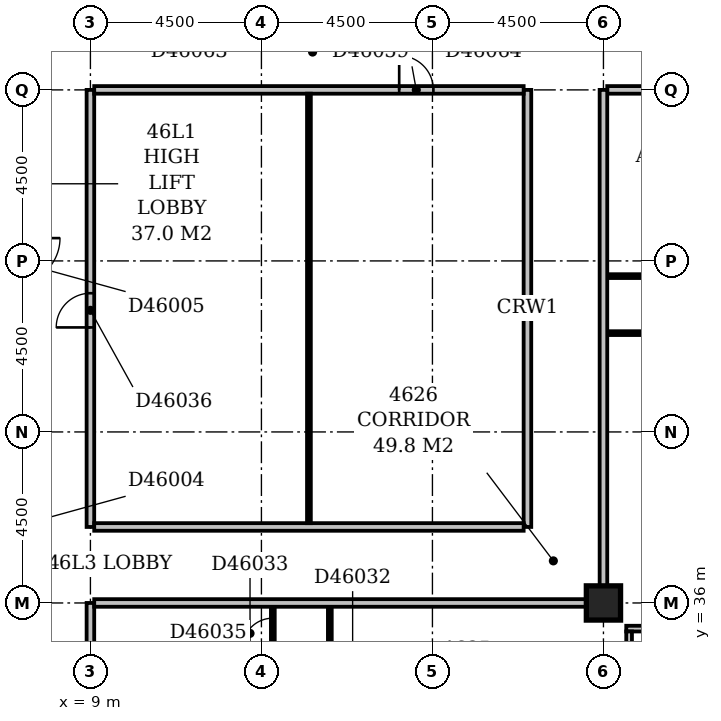
"""IFC4 building model, lengths in metres.
Left out: names, types, materials, properties, quantities, classifications, styles, units other than length and angle.
Written with IfcOpenShell. Run it as: python <this file> out.ifc"""

import sys

from ifc_helpers import new_model, si_unit, direction, frame, frame_2d, origin, origin_2d, place, context, subcontext, project, spatial, rectangle, extrude, element, fill, save


model = new_model("IFC4")
c1 = context("Model", 3, precision=1e-05, world=origin(), true_north=direction((0.0, 1.0)))
c2 = subcontext(c1, "Body", "Model", "MODEL_VIEW")
j1 = project(units=[si_unit("LENGTHUNIT", "METRE"), si_unit("PLANEANGLEUNIT", "RADIAN")], contexts=[c1])
p1 = place(None, origin())
s1 = spatial("IfcSite", under=j1, at=p1, CompositionType="ELEMENT")
p2 = place(p1, origin())
s2 = spatial("IfcBuilding", under=s1, at=p2, CompositionType="ELEMENT")
p3 = place(p2, frame((0.0, 0.0, 182.6)))
s3 = spatial("IfcBuildingStorey", under=s2, at=p3, CompositionType="ELEMENT", Elevation=182.6)
p4 = place(p3, frame((22.5, 36.0, -0.3), z_axis=(0.0, 0.0, 1.0), x_axis=(1.0, 0.0, 0.0)))
e1 = element("IfcColumn", 1, at=p4, inside=s3, PredefinedType="COLUMN", context=c2, shape_type="SweptSolid", body=[
    extrude(rectangle(XDim=0.9, YDim=0.9, at=origin_2d()), origin(), (0.0, 0.0, 1.0), 3.55),
])
p5 = place(p3, frame((23.175, 17.4, 0.0), z_axis=(0.0, 0.0, 1.0), x_axis=(0.0, 1.0, 0.0)))
e2 = element("IfcWall", 2, at=p5, inside=s3, PredefinedType="STANDARD", context=c2, shape_type="SweptSolid", body=[
    extrude(rectangle(XDim=17.85, YDim=0.15, at=frame_2d((8.925, 0.0))), origin(), (0.0, 0.0, 1.0), 2.7),
])
p6 = place(p5, frame((2.802, 0.0, 0.6)))
e3 = element("IfcOpeningElement", 3, at=p6, cuts=e2, PredefinedType="OPENING", context=c2, shape_type="SweptSolid", body=[
    extrude(rectangle(XDim=1.5, YDim=1.8, at=frame_2d((0.75, 0.9))), frame((0.0, 0.087, 0.0), z_axis=(0.0, -1.0, 0.0), x_axis=(1.0, 0.0, 0.0)), (0.0, 0.0, 1.0), 0.174),
])
p7 = place(p5, frame((6.15, 0.0, 0.6)))
e4 = element("IfcOpeningElement", 4, at=p7, cuts=e2, PredefinedType="OPENING", context=c2, shape_type="SweptSolid", body=[
    extrude(rectangle(XDim=2.4, YDim=1.8, at=frame_2d((1.2, 0.9))), frame((0.0, 0.087, 0.0), z_axis=(0.0, -1.0, 0.0), x_axis=(1.0, 0.0, 0.0)), (0.0, 0.0, 1.0), 0.174),
])
p8 = place(p5, frame((10.65, 0.0, 0.6)))
e5 = element("IfcOpeningElement", 5, at=p8, cuts=e2, PredefinedType="OPENING", context=c2, shape_type="SweptSolid", body=[
    extrude(rectangle(XDim=2.4, YDim=1.8, at=frame_2d((1.2, 0.9))), frame((0.0, 0.087, 0.0), z_axis=(0.0, -1.0, 0.0), x_axis=(1.0, 0.0, 0.0)), (0.0, 0.0, 1.0), 0.174),
])
p9 = place(p5, frame((14.869, 0.0, 0.6)))
e6 = element("IfcOpeningElement", 6, at=p9, cuts=e2, PredefinedType="OPENING", context=c2, shape_type="SweptSolid", body=[
    extrude(rectangle(XDim=2.4, YDim=1.8, at=frame_2d((1.2, 0.9))), frame((0.0, 0.087, 0.0), z_axis=(0.0, -1.0, 0.0), x_axis=(1.0, 0.0, 0.0)), (0.0, 0.0, 1.0), 0.174),
])
p10 = place(p3, frame((23.1, 35.325, 0.0), z_axis=(0.0, 0.0, 1.0), x_axis=(1.0, 0.0, 0.0)))
e7 = element("IfcWall", 7, at=p10, inside=s3, PredefinedType="STANDARD", context=c2, shape_type="SweptSolid", body=[
    extrude(rectangle(XDim=45.15, YDim=0.15, at=frame_2d((22.575, 0.0))), origin(), (0.0, 0.0, 1.0), 2.7),
])
p11 = place(p10, frame((1.989, 0.0, 0.6)))
e8 = element("IfcOpeningElement", 8, at=p11, cuts=e7, PredefinedType="OPENING", context=c2, shape_type="SweptSolid", body=[
    extrude(rectangle(XDim=1.2, YDim=1.8, at=frame_2d((0.6, 0.9))), frame((0.0, 0.087, 0.0), z_axis=(0.0, -1.0, 0.0), x_axis=(1.0, 0.0, 0.0)), (0.0, 0.0, 1.0), 0.174),
])
p12 = place(p10, frame((4.95, 0.0, 0.6)))
e9 = element("IfcOpeningElement", 9, at=p12, cuts=e7, PredefinedType="OPENING", context=c2, shape_type="SweptSolid", body=[
    extrude(rectangle(XDim=2.4, YDim=1.8, at=frame_2d((1.2, 0.9))), frame((0.0, 0.087, 0.0), z_axis=(0.0, -1.0, 0.0), x_axis=(1.0, 0.0, 0.0)), (0.0, 0.0, 1.0), 0.174),
])
p13 = place(p10, frame((9.45, 0.0, 0.6)))
e10 = element("IfcOpeningElement", 10, at=p13, cuts=e7, PredefinedType="OPENING", context=c2, shape_type="SweptSolid", body=[
    extrude(rectangle(XDim=2.4, YDim=1.8, at=frame_2d((1.2, 0.9))), frame((0.0, 0.087, 0.0), z_axis=(0.0, -1.0, 0.0), x_axis=(1.0, 0.0, 0.0)), (0.0, 0.0, 1.0), 0.174),
])
p14 = place(p10, frame((13.95, 0.0, 0.6)))
e11 = element("IfcOpeningElement", 11, at=p14, cuts=e7, PredefinedType="OPENING", context=c2, shape_type="SweptSolid", body=[
    extrude(rectangle(XDim=2.4, YDim=1.8, at=frame_2d((1.2, 0.9))), frame((0.0, 0.087, 0.0), z_axis=(0.0, -1.0, 0.0), x_axis=(1.0, 0.0, 0.0)), (0.0, 0.0, 1.0), 0.174),
])
p15 = place(p10, frame((18.45, 0.0, 0.6)))
e12 = element("IfcOpeningElement", 12, at=p15, cuts=e7, PredefinedType="OPENING", context=c2, shape_type="SweptSolid", body=[
    extrude(rectangle(XDim=2.4, YDim=1.8, at=frame_2d((1.2, 0.9))), frame((0.0, 0.087, 0.0), z_axis=(0.0, -1.0, 0.0), x_axis=(1.0, 0.0, 0.0)), (0.0, 0.0, 1.0), 0.174),
])
p16 = place(p10, frame((22.589, 0.0, 0.6)))
e13 = element("IfcOpeningElement", 13, at=p16, cuts=e7, PredefinedType="OPENING", context=c2, shape_type="SweptSolid", body=[
    extrude(rectangle(XDim=2.1, YDim=1.8, at=frame_2d((1.05, 0.9))), frame((0.0, 0.087, 0.0), z_axis=(0.0, -1.0, 0.0), x_axis=(1.0, 0.0, 0.0)), (0.0, 0.0, 1.0), 0.174),
])
p17 = place(p10, frame((28.653, 0.0, 0.6)))
e14 = element("IfcOpeningElement", 14, at=p17, cuts=e7, PredefinedType="OPENING", context=c2, shape_type="SweptSolid", body=[
    extrude(rectangle(XDim=1.5, YDim=1.8, at=frame_2d((0.75, 0.9))), frame((0.0, 0.087, 0.0), z_axis=(0.0, -1.0, 0.0), x_axis=(1.0, 0.0, 0.0)), (0.0, 0.0, 1.0), 0.174),
])
p18 = place(p10, frame((31.95, 0.0, 0.6)))
e15 = element("IfcOpeningElement", 15, at=p18, cuts=e7, PredefinedType="OPENING", context=c2, shape_type="SweptSolid", body=[
    extrude(rectangle(XDim=2.4, YDim=1.8, at=frame_2d((1.2, 0.9))), frame((0.0, 0.087, 0.0), z_axis=(0.0, -1.0, 0.0), x_axis=(1.0, 0.0, 0.0)), (0.0, 0.0, 1.0), 0.174),
])
p19 = place(p10, frame((36.45, 0.0, 0.6)))
e16 = element("IfcOpeningElement", 16, at=p19, cuts=e7, PredefinedType="OPENING", context=c2, shape_type="SweptSolid", body=[
    extrude(rectangle(XDim=2.4, YDim=1.8, at=frame_2d((1.2, 0.9))), frame((0.0, 0.087, 0.0), z_axis=(0.0, -1.0, 0.0), x_axis=(1.0, 0.0, 0.0)), (0.0, 0.0, 1.0), 0.174),
])
p20 = place(p10, frame((40.95, 0.0, 0.6)))
e17 = element("IfcOpeningElement", 17, at=p20, cuts=e7, PredefinedType="OPENING", context=c2, shape_type="SweptSolid", body=[
    extrude(rectangle(XDim=2.4, YDim=1.8, at=frame_2d((1.2, 0.9))), frame((0.0, 0.087, 0.0), z_axis=(0.0, -1.0, 0.0), x_axis=(1.0, 0.0, 0.0)), (0.0, 0.0, 1.0), 0.174),
])
p21 = place(p3, frame((9.0, 5.0, 0.0), z_axis=(0.0, 0.0, 1.0), x_axis=(0.0, 1.0, 0.0)))
e18 = element("IfcWall", 18, at=p21, inside=s3, PredefinedType="PARTITIONING", context=c2, shape_type="SweptSolid", body=[
    extrude(rectangle(XDim=31.0, YDim=0.2, at=frame_2d((15.5, 0.0))), origin(), (0.0, 0.0, 1.0), 3.25),
])
p22 = place(p21, frame((17.8, 0.0, 0.0)))
e19 = element("IfcOpeningElement", 19, at=p22, cuts=e18, PredefinedType="OPENING", context=c2, shape_type="SweptSolid", body=[
    extrude(rectangle(XDim=1.0, YDim=2.1, at=frame_2d((0.5, 1.05))), frame((0.0, 0.112, 0.0), z_axis=(0.0, -1.0, 0.0), x_axis=(1.0, 0.0, 0.0)), (0.0, 0.0, 1.0), 0.224),
])
p23 = place(p21, frame((14.95, 0.0, 0.0)))
e20 = element("IfcOpeningElement", 20, at=p23, cuts=e18, PredefinedType="OPENING", context=c2, shape_type="SweptSolid", body=[
    extrude(rectangle(XDim=1.0, YDim=2.1, at=frame_2d((0.5, 1.05))), frame((0.0, 0.112, 0.0), z_axis=(0.0, -1.0, 0.0), x_axis=(1.0, 0.0, 0.0)), (0.0, 0.0, 1.0), 0.224),
])
p24 = place(p21, frame((9.3, 0.0, 0.0)))
e21 = element("IfcOpeningElement", 21, at=p24, cuts=e18, PredefinedType="OPENING", context=c2, shape_type="SweptSolid", body=[
    extrude(rectangle(XDim=1.0, YDim=2.1, at=frame_2d((0.5, 1.05))), frame((0.0, 0.112, 0.0), z_axis=(0.0, -1.0, 0.0), x_axis=(1.0, 0.0, 0.0)), (0.0, 0.0, 1.0), 0.224),
])
p25 = place(p21, frame((1.5, 0.0, 0.0)))
e22 = element("IfcOpeningElement", 22, at=p25, cuts=e18, PredefinedType="OPENING", context=c2, shape_type="SweptSolid", body=[
    extrude(rectangle(XDim=0.9, YDim=2.1, at=frame_2d((0.45, 1.05))), frame((0.0, 0.112, 0.0), z_axis=(0.0, -1.0, 0.0), x_axis=(1.0, 0.0, 0.0)), (0.0, 0.0, 1.0), 0.224),
])
p26 = place(p3, frame((15.3, 22.6, 0.0), z_axis=(0.0, 0.0, 1.0), x_axis=(0.0, 1.0, 0.0)))
e23 = element("IfcWall", 23, at=p26, inside=s3, PredefinedType="PARTITIONING", context=c2, shape_type="SweptSolid", body=[
    extrude(rectangle(XDim=13.3, YDim=0.1, at=frame_2d((6.65, 0.0))), origin(), (0.0, 0.0, 1.0), 3.25),
])
p27 = place(p26, frame((1.7, 0.0, 0.0)))
e24 = element("IfcOpeningElement", 24, at=p27, cuts=e23, PredefinedType="OPENING", context=c2, shape_type="SweptSolid", body=[
    extrude(rectangle(XDim=0.9, YDim=2.1, at=frame_2d((0.45, 1.05))), frame((0.0, 0.062, 0.0), z_axis=(0.0, -1.0, 0.0), x_axis=(1.0, 0.0, 0.0)), (0.0, 0.0, 1.0), 0.124),
])
p28 = place(p26, frame((6.2, 0.0, 0.0)))
e25 = element("IfcOpeningElement", 25, at=p28, cuts=e23, PredefinedType="OPENING", context=c2, shape_type="SweptSolid", body=[
    extrude(rectangle(XDim=0.9, YDim=2.1, at=frame_2d((0.45, 1.05))), frame((0.0, 0.062, 0.0), z_axis=(0.0, -1.0, 0.0), x_axis=(1.0, 0.0, 0.0)), (0.0, 0.0, 1.0), 0.124),
])
p29 = place(p26, frame((10.7, 0.0, 0.0)))
e26 = element("IfcOpeningElement", 26, at=p29, cuts=e23, PredefinedType="OPENING", context=c2, shape_type="SweptSolid", body=[
    extrude(rectangle(XDim=0.9, YDim=2.1, at=frame_2d((0.45, 1.05))), frame((0.0, 0.062, 0.0), z_axis=(0.0, -1.0, 0.0), x_axis=(1.0, 0.0, 0.0)), (0.0, 0.0, 1.0), 0.124),
])
p30 = place(p3, frame((13.8, 24.1, 0.0), z_axis=(0.0, 0.0, 1.0), x_axis=(0.0, 1.0, 0.0)))
e27 = element("IfcWall", 27, at=p30, inside=s3, PredefinedType="PARTITIONING", context=c2, shape_type="SweptSolid", body=[
    extrude(rectangle(XDim=11.8, YDim=0.1, at=frame_2d((5.9, 0.0))), origin(), (0.0, 0.0, 1.0), 3.25),
])
p31 = place(p30, frame((8.7, 0.0, 0.0)))
e28 = element("IfcOpeningElement", 28, at=p31, cuts=e27, PredefinedType="OPENING", context=c2, shape_type="SweptSolid", body=[
    extrude(rectangle(XDim=0.8, YDim=2.1, at=frame_2d((0.4, 1.05))), frame((0.0, 0.062, 0.0), z_axis=(0.0, -1.0, 0.0), x_axis=(1.0, 0.0, 0.0)), (0.0, 0.0, 1.0), 0.124),
])
p32 = place(p30, frame((3.5, 0.0, 0.0)))
e29 = element("IfcOpeningElement", 29, at=p32, cuts=e27, PredefinedType="OPENING", context=c2, shape_type="SweptSolid", body=[
    extrude(rectangle(XDim=0.9, YDim=2.1, at=frame_2d((0.45, 1.05))), frame((0.0, 0.062, 0.0), z_axis=(0.0, -1.0, 0.0), x_axis=(1.0, 0.0, 0.0)), (0.0, 0.0, 1.0), 0.124),
])
p33 = place(p30, frame((10.7, 0.0, 0.0)))
e30 = element("IfcOpeningElement", 30, at=p33, cuts=e27, PredefinedType="OPENING", context=c2, shape_type="SweptSolid", body=[
    extrude(rectangle(XDim=0.8, YDim=2.1, at=frame_2d((0.4, 1.05))), frame((0.0, 0.062, 0.0), z_axis=(0.0, -1.0, 0.0), x_axis=(1.0, 0.0, 0.0)), (0.0, 0.0, 1.0), 0.124),
])
p34 = place(p3, frame((9.1, 36.0, 0.0), z_axis=(0.0, 0.0, 1.0), x_axis=(1.0, 0.0, 0.0)))
e31 = element("IfcWall", 31, at=p34, inside=s3, PredefinedType="PARTITIONING", context=c2, shape_type="SweptSolid", body=[
    extrude(rectangle(XDim=12.95, YDim=0.2, at=frame_2d((6.475, 0.0))), origin(), (0.0, 0.0, 1.0), 3.25),
])
p35 = place(p3, frame((22.5, 36.45, 0.0), z_axis=(0.0, 0.0, 1.0), x_axis=(0.0, 1.0, 0.0)))
e32 = element("IfcWall", 32, at=p35, inside=s3, PredefinedType="PARTITIONING", context=c2, shape_type="SweptSolid", body=[
    extrude(rectangle(XDim=13.05, YDim=0.2, at=frame_2d((6.525, 0.0))), origin(), (0.0, 0.0, 1.0), 3.25),
])
p36 = place(p3, frame((9.0, 38.0, 0.0), z_axis=(0.0, 0.0, 1.0), x_axis=(0.0, 1.0, 0.0)))
e33 = element("IfcWall", 33, at=p36, inside=s3, PredefinedType="PARTITIONING", context=c2, shape_type="SweptSolid", body=[
    extrude(rectangle(XDim=11.5, YDim=0.2, at=frame_2d((5.75, 0.0))), origin(), (0.0, 0.0, 1.0), 3.25),
])
p37 = place(p36, frame((5.25, 0.0, 0.0)))
e34 = element("IfcOpeningElement", 34, at=p37, cuts=e33, PredefinedType="OPENING", context=c2, shape_type="SweptSolid", body=[
    extrude(rectangle(XDim=0.9, YDim=2.1, at=frame_2d((0.45, 1.05))), frame((0.0, 0.112, 0.0), z_axis=(0.0, -1.0, 0.0), x_axis=(1.0, 0.0, 0.0)), (0.0, 0.0, 1.0), 0.224),
])
p38 = place(p3, frame((9.1, 38.0, 0.0), z_axis=(0.0, 0.0, 1.0), x_axis=(1.0, 0.0, 0.0)))
e35 = element("IfcWall", 35, at=p38, inside=s3, PredefinedType="PARTITIONING", context=c2, shape_type="SweptSolid", body=[
    extrude(rectangle(XDim=11.3, YDim=0.2, at=frame_2d((5.65, 0.0))), origin(), (0.0, 0.0, 1.0), 3.25),
])
p39 = place(p3, frame((20.5, 38.0, 0.0), z_axis=(0.0, 0.0, 1.0), x_axis=(0.0, 1.0, 0.0)))
e36 = element("IfcWall", 36, at=p39, inside=s3, PredefinedType="PARTITIONING", context=c2, shape_type="SweptSolid", body=[
    extrude(rectangle(XDim=11.5, YDim=0.2, at=frame_2d((5.75, 0.0))), origin(), (0.0, 0.0, 1.0), 3.25),
])
p40 = place(p3, frame((14.75, 38.1, 0.0), z_axis=(0.0, 0.0, 1.0), x_axis=(0.0, 1.0, 0.0)))
e37 = element("IfcWall", 37, at=p40, inside=s3, PredefinedType="PARTITIONING", context=c2, shape_type="SweptSolid", body=[
    extrude(rectangle(XDim=11.3, YDim=0.1, at=frame_2d((5.65, 0.0))), origin(), (0.0, 0.0, 1.0), 3.25),
])
p41 = place(p3, frame((22.6, 43.1, 0.0), z_axis=(0.0, 0.0, 1.0), x_axis=(1.0, 0.0, 0.0)))
e38 = element("IfcWall", 38, at=p41, inside=s3, PredefinedType="PARTITIONING", context=c2, shape_type="SweptSolid", body=[
    extrude(rectangle(XDim=17.8, YDim=0.1, at=frame_2d((8.9, 0.0))), origin(), (0.0, 0.0, 1.0), 3.25),
])
p42 = place(p41, frame((3.9, 0.0, 0.0)))
e39 = element("IfcOpeningElement", 39, at=p42, cuts=e38, PredefinedType="OPENING", context=c2, shape_type="SweptSolid", body=[
    extrude(rectangle(XDim=0.9, YDim=2.1, at=frame_2d((0.45, 1.05))), frame((0.0, 0.062, 0.0), z_axis=(0.0, -1.0, 0.0), x_axis=(1.0, 0.0, 0.0)), (0.0, 0.0, 1.0), 0.124),
])
p43 = place(p41, frame((10.7, 0.0, 0.0)))
e40 = element("IfcOpeningElement", 40, at=p43, cuts=e38, PredefinedType="OPENING", context=c2, shape_type="SweptSolid", body=[
    extrude(rectangle(XDim=0.9, YDim=2.1, at=frame_2d((0.45, 1.05))), frame((0.0, 0.062, 0.0), z_axis=(0.0, -1.0, 0.0), x_axis=(1.0, 0.0, 0.0)), (0.0, 0.0, 1.0), 0.124),
])
p44 = place(p41, frame((14.05, 0.0, 0.0)))
e41 = element("IfcOpeningElement", 41, at=p44, cuts=e38, PredefinedType="OPENING", context=c2, shape_type="SweptSolid", body=[
    extrude(rectangle(XDim=0.9, YDim=2.1, at=frame_2d((0.45, 1.05))), frame((0.0, 0.062, 0.0), z_axis=(0.0, -1.0, 0.0), x_axis=(1.0, 0.0, 0.0)), (0.0, 0.0, 1.0), 0.124),
])
p45 = place(p3, frame((22.6, 44.6, 0.0), z_axis=(0.0, 0.0, 1.0), x_axis=(1.0, 0.0, 0.0)))
e42 = element("IfcWall", 42, at=p45, inside=s3, PredefinedType="PARTITIONING", context=c2, shape_type="SweptSolid", body=[
    extrude(rectangle(XDim=6.75, YDim=0.1, at=frame_2d((3.375, 0.0))), origin(), (0.0, 0.0, 1.0), 3.25),
])
p46 = place(p45, frame((2.9, 0.0, 0.0)))
e43 = element("IfcOpeningElement", 43, at=p46, cuts=e42, PredefinedType="OPENING", context=c2, shape_type="SweptSolid", body=[
    extrude(rectangle(XDim=0.9, YDim=2.1, at=frame_2d((0.45, 1.05))), frame((0.0, 0.062, 0.0), z_axis=(0.0, -1.0, 0.0), x_axis=(1.0, 0.0, 0.0)), (0.0, 0.0, 1.0), 0.124),
])
p47 = place(p3, frame((9.1, 49.5, 0.0), z_axis=(0.0, 0.0, 1.0), x_axis=(1.0, 0.0, 0.0)))
e44 = element("IfcWall", 44, at=p47, inside=s3, PredefinedType="PARTITIONING", context=c2, shape_type="SweptSolid", body=[
    extrude(rectangle(XDim=11.3, YDim=0.2, at=frame_2d((5.65, 0.0))), origin(), (0.0, 0.0, 1.0), 3.25),
])
p48 = place(p47, frame((8.025, 0.0, 0.0)))
e45 = element("IfcOpeningElement", 45, at=p48, cuts=e44, PredefinedType="OPENING", context=c2, shape_type="SweptSolid", body=[
    extrude(rectangle(XDim=0.9, YDim=2.1, at=frame_2d((0.45, 1.05))), frame((0.0, 0.112, 0.0), z_axis=(0.0, -1.0, 0.0), x_axis=(1.0, 0.0, 0.0)), (0.0, 0.0, 1.0), 0.224),
])
p49 = place(p3, frame((22.6, 49.5, 0.0), z_axis=(0.0, 0.0, 1.0), x_axis=(1.0, 0.0, 0.0)))
e46 = element("IfcWall", 46, at=p49, inside=s3, PredefinedType="PARTITIONING", context=c2, shape_type="SweptSolid", body=[
    extrude(rectangle(XDim=44.45, YDim=0.2, at=frame_2d((22.225, 0.0))), origin(), (0.0, 0.0, 1.0), 3.25),
])
p50 = place(p49, frame((7.1, 0.0, 0.0)))
e47 = element("IfcOpeningElement", 47, at=p50, cuts=e46, PredefinedType="OPENING", context=c2, shape_type="SweptSolid", body=[
    extrude(rectangle(XDim=1.0, YDim=2.1, at=frame_2d((0.5, 1.05))), frame((0.0, 0.112, 0.0), z_axis=(0.0, -1.0, 0.0), x_axis=(1.0, 0.0, 0.0)), (0.0, 0.0, 1.0), 0.224),
])
p51 = place(p49, frame((26.1, 0.0, 0.0)))
e48 = element("IfcOpeningElement", 48, at=p51, cuts=e46, PredefinedType="OPENING", context=c2, shape_type="SweptSolid", body=[
    extrude(rectangle(XDim=1.0, YDim=2.1, at=frame_2d((0.5, 1.05))), frame((0.0, 0.112, 0.0), z_axis=(0.0, -1.0, 0.0), x_axis=(1.0, 0.0, 0.0)), (0.0, 0.0, 1.0), 0.224),
])
p52 = place(p49, frame((31.8, 0.0, 0.0)))
e49 = element("IfcOpeningElement", 49, at=p52, cuts=e46, PredefinedType="OPENING", context=c2, shape_type="SweptSolid", body=[
    extrude(rectangle(XDim=1.0, YDim=2.1, at=frame_2d((0.5, 1.05))), frame((0.0, 0.112, 0.0), z_axis=(0.0, -1.0, 0.0), x_axis=(1.0, 0.0, 0.0)), (0.0, 0.0, 1.0), 0.224),
])
p53 = place(p33, origin())
e50 = element("IfcDoor", 50, at=p53, inside=s3, OperationType="SINGLE_SWING_LEFT", PredefinedType="DOOR", context=c2, shape_type="SweptSolid", body=[
    extrude(rectangle(XDim=0.8, YDim=2.1, at=frame_2d((0.4, 1.05))), frame((0.0, 0.025, 0.0), z_axis=(0.0, -1.0, 0.0), x_axis=(1.0, 0.0, 0.0)), (0.0, 0.0, 1.0), 0.05),
])
fill(e30, e50)
p54 = place(p37, origin())
e51 = element("IfcDoor", 51, at=p54, inside=s3, OperationType="SINGLE_SWING_LEFT", PredefinedType="DOOR", context=c2, shape_type="SweptSolid", body=[
    extrude(rectangle(XDim=0.9, YDim=2.1, at=frame_2d((0.45, 1.05))), frame((0.0, 0.025, 0.0), z_axis=(0.0, -1.0, 0.0), x_axis=(1.0, 0.0, 0.0)), (0.0, 0.0, 1.0), 0.05),
])
fill(e34, e51)
p55 = place(p48, origin())
e52 = element("IfcDoor", 52, at=p55, inside=s3, OperationType="SINGLE_SWING_LEFT", PredefinedType="DOOR", context=c2, shape_type="SweptSolid", body=[
    extrude(rectangle(XDim=0.9, YDim=2.1, at=frame_2d((0.45, 1.05))), frame((0.0, 0.025, 0.0), z_axis=(0.0, -1.0, 0.0), x_axis=(1.0, 0.0, 0.0)), (0.0, 0.0, 1.0), 0.05),
])
fill(e45, e52)
save(model, sys.argv[1])
